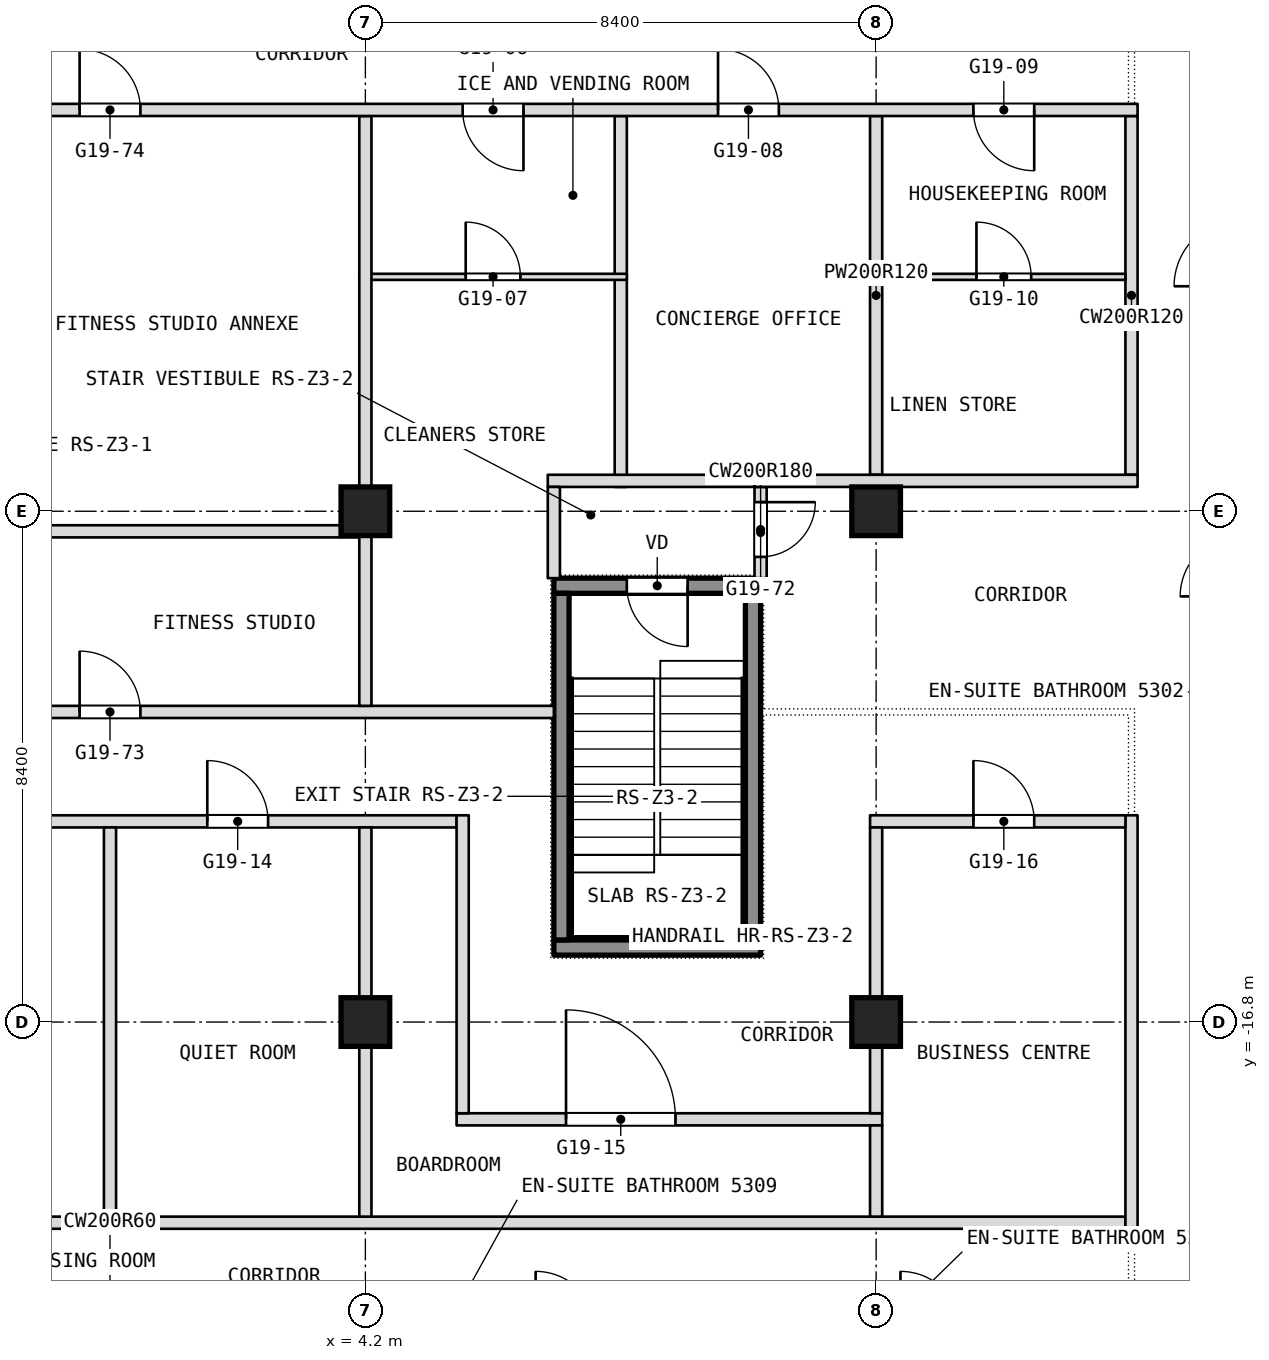
"""IFC4 building model, lengths in metres.
Left out: names, types, materials, properties, quantities, classifications, styles, units other than length and angle.
Written with IfcOpenShell. Run it as: python <this file> out.ifc"""

import sys

from ifc_helpers import new_model, si_unit, direction, frame, frame_2d, origin, origin_2d, place, context, subcontext, project, spatial, rectangle, extrude, element, fill, save


model = new_model("IFC4")
c1 = context("Model", 3, precision=1e-05, world=origin(), true_north=direction((0.0, 1.0)))
c2 = subcontext(c1, "Body", "Model", "MODEL_VIEW")
j1 = project(units=[si_unit("LENGTHUNIT", "METRE"), si_unit("PLANEANGLEUNIT", "RADIAN")], contexts=[c1])
p1 = place(None, origin())
s1 = spatial("IfcSite", under=j1, at=p1, CompositionType="ELEMENT")
p2 = place(p1, origin())
s2 = spatial("IfcBuilding", under=s1, at=p2, CompositionType="ELEMENT")
p3 = place(p2, frame((0.0, 0.0, 227.3)))
s3 = spatial("IfcBuildingStorey", under=s2, at=p3, CompositionType="ELEMENT", Elevation=227.3)
for number, where, z_axis, x_axis in (
    (1, (4.2, -16.8, 0.0), (0.0, 0.0, 1.0), (1.0, 0.0, 0.0)),
    (2, (4.2, -8.4, 0.0), (0.0, 0.0, 1.0), (1.0, 0.0, 0.0)),
    (3, (12.6, -16.8, 0.0), (0.0, 0.0, 1.0), (1.0, 0.0, 0.0)),
    (4, (12.6, -8.4, 0.0), (0.0, 0.0, 1.0), (1.0, 0.0, 0.0)),
):
    element("IfcColumn", number, at=place(p3, frame(where, z_axis=z_axis, x_axis=x_axis)), inside=s3, PredefinedType="COLUMN", context=c2, shape_type="SweptSolid", body=[
        extrude(rectangle(XDim=0.8, YDim=0.8, at=origin_2d()), origin(), (0.0, 0.0, 1.0), 3.6),
    ])
p4 = place(p3, frame((-16.7, -20.1, 0.0), z_axis=(0.0, 0.0, 1.0), x_axis=(1.0, 0.0, 0.0)))
e5 = element("IfcWall", 5, at=p4, inside=s3, PredefinedType="PARTITIONING", context=c2, shape_type="SweptSolid", body=[
    extrude(rectangle(XDim=33.4, YDim=0.2, at=frame_2d((16.7, 0.0))), origin(), (0.0, 0.0, 1.0), 3.34),
])
p5 = place(p3, frame((5.7, -18.4, 0.0), z_axis=(0.0, 0.0, 1.0), x_axis=(1.0, 0.0, 0.0)))
e6 = element("IfcWall", 6, at=p5, inside=s3, PredefinedType="PARTITIONING", context=c2, shape_type="SweptSolid", body=[
    extrude(rectangle(XDim=7.0, YDim=0.2, at=frame_2d((3.5, 0.0))), origin(), (0.0, 0.0, 1.0), 3.34),
])
p6 = place(p5, frame((1.8, 0.0, 0.0)))
e7 = element("IfcOpeningElement", 7, at=p6, cuts=e6, PredefinedType="OPENING", context=c2, shape_type="SweptSolid", body=[
    extrude(rectangle(XDim=1.8, YDim=2.1, at=frame_2d((0.9, 1.05))), frame((0.0, 0.1, 0.0), z_axis=(0.0, -1.0, 0.0), x_axis=(1.0, 0.0, 0.0)), (0.0, 0.0, 1.0), 0.2),
])
p7 = place(p3, frame((16.8, -20.2, 0.0), z_axis=(0.0, 0.0, 1.0), x_axis=(0.0, 1.0, 0.0)))
e8 = element("IfcWall", 8, at=p7, inside=s3, PredefinedType="PARTITIONING", context=c2, shape_type="SweptSolid", body=[
    extrude(rectangle(XDim=6.8, YDim=0.2, at=frame_2d((3.4, 0.0))), origin(), (0.0, 0.0, 1.0), 3.34),
])
p8 = place(p3, frame((16.8, -7.8, 0.0), z_axis=(0.0, 0.0, 1.0), x_axis=(0.0, 1.0, 0.0)))
e9 = element("IfcWall", 9, at=p8, inside=s3, PredefinedType="PARTITIONING", context=c2, shape_type="SweptSolid", body=[
    extrude(rectangle(XDim=5.9, YDim=0.2, at=frame_2d((2.95, 0.0))), origin(), (0.0, 0.0, 1.0), 3.34),
])
p9 = place(p3, frame((-5.9, -13.5, 0.0), z_axis=(0.0, 0.0, 1.0), x_axis=(1.0, 0.0, 0.0)))
e10 = element("IfcWall", 10, at=p9, inside=s3, PredefinedType="PARTITIONING", context=c2, shape_type="SweptSolid", body=[
    extrude(rectangle(XDim=11.6, YDim=0.2, at=frame_2d((5.8, 0.0))), origin(), (0.0, 0.0, 1.0), 3.34),
])
p10 = place(p9, frame((3.3, 0.0, 0.0)))
e11 = element("IfcOpeningElement", 11, at=p10, cuts=e10, PredefinedType="OPENING", context=c2, shape_type="SweptSolid", body=[
    extrude(rectangle(XDim=1.0, YDim=2.1, at=frame_2d((0.5, 1.05))), frame((0.0, 0.1, 0.0), z_axis=(0.0, -1.0, 0.0), x_axis=(1.0, 0.0, 0.0)), (0.0, 0.0, 1.0), 0.2),
])
p11 = place(p9, frame((7.5, 0.0, 0.0)))
e12 = element("IfcOpeningElement", 12, at=p11, cuts=e10, PredefinedType="OPENING", context=c2, shape_type="SweptSolid", body=[
    extrude(rectangle(XDim=1.0, YDim=2.1, at=frame_2d((0.5, 1.05))), frame((0.0, 0.1, 0.0), z_axis=(0.0, -1.0, 0.0), x_axis=(1.0, 0.0, 0.0)), (0.0, 0.0, 1.0), 0.2),
])
p12 = place(p3, frame((12.5, -13.5, 0.0), z_axis=(0.0, 0.0, 1.0), x_axis=(1.0, 0.0, 0.0)))
e13 = element("IfcWall", 13, at=p12, inside=s3, PredefinedType="PARTITIONING", context=c2, shape_type="SweptSolid", body=[
    extrude(rectangle(XDim=4.2, YDim=0.2, at=frame_2d((2.1, 0.0))), origin(), (0.0, 0.0, 1.0), 3.34),
])
p13 = place(p12, frame((1.7, 0.0, 0.0)))
e14 = element("IfcOpeningElement", 14, at=p13, cuts=e13, PredefinedType="OPENING", context=c2, shape_type="SweptSolid", body=[
    extrude(rectangle(XDim=1.0, YDim=2.1, at=frame_2d((0.5, 1.05))), frame((0.0, 0.1, 0.0), z_axis=(0.0, -1.0, 0.0), x_axis=(1.0, 0.0, 0.0)), (0.0, 0.0, 1.0), 0.2),
])
p14 = place(p3, frame((12.6, -20.0, 0.0), z_axis=(0.0, 0.0, 1.0), x_axis=(0.0, 1.0, 0.0)))
e15 = element("IfcWall", 15, at=p14, inside=s3, PredefinedType="PARTITIONING", context=c2, shape_type="SweptSolid", body=[
    extrude(rectangle(XDim=1.5, YDim=0.2, at=frame_2d((0.75, 0.0))), origin(), (0.0, 0.0, 1.0), 3.34),
])
p15 = place(p3, frame((12.6, -7.8, 0.0), z_axis=(0.0, 0.0, 1.0), x_axis=(0.0, 1.0, 0.0)))
e16 = element("IfcWall", 16, at=p15, inside=s3, PredefinedType="PARTITIONING", context=c2, shape_type="SweptSolid", body=[
    extrude(rectangle(XDim=5.9, YDim=0.2, at=frame_2d((2.95, 0.0))), origin(), (0.0, 0.0, 1.0), 3.34),
])
p16 = place(p3, frame((12.6, -18.3, 0.0), z_axis=(0.0, 0.0, 1.0), x_axis=(0.0, 1.0, 0.0)))
e17 = element("IfcWall", 17, at=p16, inside=s3, PredefinedType="PARTITIONING", context=c2, shape_type="SweptSolid", body=[
    extrude(rectangle(XDim=4.7, YDim=0.2, at=frame_2d((2.35, 0.0))), origin(), (0.0, 0.0, 1.0), 3.34),
])
p17 = place(p3, frame((-7.3, -11.7, 0.0), z_axis=(0.0, 0.0, 1.0), x_axis=(1.0, 0.0, 0.0)))
e18 = element("IfcWall", 18, at=p17, inside=s3, PredefinedType="PARTITIONING", context=c2, shape_type="SweptSolid", body=[
    extrude(rectangle(XDim=14.6, YDim=0.2, at=frame_2d((7.3, 0.0))), origin(), (0.0, 0.0, 1.0), 3.34),
])
p18 = place(p17, frame((6.8, 0.0, 0.0)))
e19 = element("IfcOpeningElement", 19, at=p18, cuts=e18, PredefinedType="OPENING", context=c2, shape_type="SweptSolid", body=[
    extrude(rectangle(XDim=1.0, YDim=2.1, at=frame_2d((0.5, 1.05))), frame((0.0, 0.1, 0.0), z_axis=(0.0, -1.0, 0.0), x_axis=(1.0, 0.0, 0.0)), (0.0, 0.0, 1.0), 0.2),
])
p19 = place(p3, frame((10.7, -9.5, 0.0), z_axis=(0.0, 0.0, 1.0), x_axis=(0.0, 1.0, 0.0)))
e20 = element("IfcWall", 20, at=p19, inside=s3, PredefinedType="PARTITIONING", context=c2, shape_type="SweptSolid", body=[
    extrude(rectangle(XDim=1.5, YDim=0.2, at=frame_2d((0.75, 0.0))), origin(), (0.0, 0.0, 1.0), 3.34),
])
p20 = place(p19, frame((0.35, 0.0, 0.0)))
e21 = element("IfcOpeningElement", 21, at=p20, cuts=e20, PredefinedType="OPENING", context=c2, shape_type="SweptSolid", body=[
    extrude(rectangle(XDim=0.9, YDim=2.1, at=frame_2d((0.45, 1.05))), frame((0.0, 0.1, 0.0), z_axis=(0.0, -1.0, 0.0), x_axis=(1.0, 0.0, 0.0)), (0.0, 0.0, 1.0), 0.2),
])
p21 = place(p3, frame((-4.1, -8.73, 0.0), z_axis=(0.0, 0.0, 1.0), x_axis=(1.0, 0.0, 0.0)))
e22 = element("IfcWall", 22, at=p21, inside=s3, PredefinedType="PARTITIONING", context=c2, shape_type="SweptSolid", body=[
    extrude(rectangle(XDim=8.2, YDim=0.2, at=frame_2d((4.1, 0.0))), origin(), (0.0, 0.0, 1.0), 3.34),
])
p22 = place(p3, frame((8.4, -8.0, 0.0), z_axis=(0.0, 0.0, 1.0), x_axis=(0.0, 1.0, 0.0)))
e23 = element("IfcWall", 23, at=p22, inside=s3, PredefinedType="PARTITIONING", context=c2, shape_type="SweptSolid", body=[
    extrude(rectangle(XDim=6.1, YDim=0.2, at=frame_2d((3.05, 0.0))), origin(), (0.0, 0.0, 1.0), 3.34),
])
p23 = place(p3, frame((10.6, -7.9, 0.0), z_axis=(0.0, 0.0, 1.0), x_axis=(1.0, 0.0, 0.0)))
e24 = element("IfcWall", 24, at=p23, inside=s3, PredefinedType="PARTITIONING", context=c2, shape_type="SweptSolid", body=[
    extrude(rectangle(XDim=6.3, YDim=0.2, at=frame_2d((3.15, 0.0))), origin(), (0.0, 0.0, 1.0), 3.34),
])
p24 = place(p3, frame((7.2, -7.9, 0.0), z_axis=(0.0, 0.0, 1.0), x_axis=(1.0, 0.0, 0.0)))
e25 = element("IfcWall", 25, at=p24, inside=s3, PredefinedType="PARTITIONING", context=c2, shape_type="SweptSolid", body=[
    extrude(rectangle(XDim=3.4, YDim=0.2, at=frame_2d((1.7, 0.0))), origin(), (0.0, 0.0, 1.0), 3.34),
])
p25 = place(p3, frame((7.3, -9.5, 0.0), z_axis=(0.0, 0.0, 1.0), x_axis=(0.0, 1.0, 0.0)))
e26 = element("IfcWall", 26, at=p25, inside=s3, PredefinedType="PARTITIONING", context=c2, shape_type="SweptSolid", body=[
    extrude(rectangle(XDim=1.5, YDim=0.2, at=frame_2d((0.75, 0.0))), origin(), (0.0, 0.0, 1.0), 3.34),
])
p26 = place(p3, frame((5.8, -18.3, 0.0), z_axis=(0.0, 0.0, 1.0), x_axis=(0.0, 1.0, 0.0)))
e27 = element("IfcWall", 27, at=p26, inside=s3, PredefinedType="PARTITIONING", context=c2, shape_type="SweptSolid", body=[
    extrude(rectangle(XDim=4.9, YDim=0.2, at=frame_2d((2.45, 0.0))), origin(), (0.0, 0.0, 1.0), 3.34),
])
p27 = place(p3, frame((4.1, -4.545, 0.0), z_axis=(0.0, 0.0, 1.0), x_axis=(1.0, 0.0, 0.0)))
e28 = element("IfcWall", 28, at=p27, inside=s3, PredefinedType="PARTITIONING", context=c2, shape_type="SweptSolid", body=[
    extrude(rectangle(XDim=4.4, YDim=0.1, at=frame_2d((2.2, 0.0))), origin(), (0.0, 0.0, 1.0), 3.34),
])
p28 = place(p27, frame((1.75, 0.0, 0.0)))
e29 = element("IfcOpeningElement", 29, at=p28, cuts=e28, PredefinedType="OPENING", context=c2, shape_type="SweptSolid", body=[
    extrude(rectangle(XDim=0.9, YDim=2.1, at=frame_2d((0.45, 1.05))), frame((0.0, 0.05, 0.0), z_axis=(0.0, -1.0, 0.0), x_axis=(1.0, 0.0, 0.0)), (0.0, 0.0, 1.0), 0.1),
])
p29 = place(p3, frame((12.7, -4.545, 0.0), z_axis=(0.0, 0.0, 1.0), x_axis=(1.0, 0.0, 0.0)))
e30 = element("IfcWall", 30, at=p29, inside=s3, PredefinedType="PARTITIONING", context=c2, shape_type="SweptSolid", body=[
    extrude(rectangle(XDim=4.0, YDim=0.1, at=frame_2d((2.0, 0.0))), origin(), (0.0, 0.0, 1.0), 3.34),
])
p30 = place(p29, frame((1.55, 0.0, 0.0)))
e31 = element("IfcOpeningElement", 31, at=p30, cuts=e30, PredefinedType="OPENING", context=c2, shape_type="SweptSolid", body=[
    extrude(rectangle(XDim=0.9, YDim=2.1, at=frame_2d((0.45, 1.05))), frame((0.0, 0.05, 0.0), z_axis=(0.0, -1.0, 0.0), x_axis=(1.0, 0.0, 0.0)), (0.0, 0.0, 1.0), 0.1),
])
p31 = place(p3, frame((4.2, -20.0, 0.0), z_axis=(0.0, 0.0, 1.0), x_axis=(0.0, 1.0, 0.0)))
e32 = element("IfcWall", 32, at=p31, inside=s3, PredefinedType="PARTITIONING", context=c2, shape_type="SweptSolid", body=[
    extrude(rectangle(XDim=6.4, YDim=0.2, at=frame_2d((3.2, 0.0))), origin(), (0.0, 0.0, 1.0), 3.34),
])
p32 = place(p3, frame((4.2, -11.6, 0.0), z_axis=(0.0, 0.0, 1.0), x_axis=(0.0, 1.0, 0.0)))
e33 = element("IfcWall", 33, at=p32, inside=s3, PredefinedType="PARTITIONING", context=c2, shape_type="SweptSolid", body=[
    extrude(rectangle(XDim=9.7, YDim=0.2, at=frame_2d((4.85, 0.0))), origin(), (0.0, 0.0, 1.0), 3.34),
])
p33 = place(p3, frame((-16.9, -1.8, 0.0), z_axis=(0.0, 0.0, 1.0), x_axis=(1.0, 0.0, 0.0)))
e34 = element("IfcWall", 34, at=p33, inside=s3, PredefinedType="PARTITIONING", context=c2, shape_type="SweptSolid", body=[
    extrude(rectangle(XDim=33.8, YDim=0.2, at=frame_2d((16.9, 0.0))), origin(), (0.0, 0.0, 1.0), 3.34),
])
p34 = place(p33, frame((1.7, 0.0, 0.0)))
e35 = element("IfcOpeningElement", 35, at=p34, cuts=e34, PredefinedType="OPENING", context=c2, shape_type="SweptSolid", body=[
    extrude(rectangle(XDim=1.0, YDim=2.1, at=frame_2d((0.5, 1.05))), frame((0.0, 0.1, 0.0), z_axis=(0.0, -1.0, 0.0), x_axis=(1.0, 0.0, 0.0)), (0.0, 0.0, 1.0), 0.2),
])
p35 = place(p33, frame((5.9, 0.0, 0.0)))
e36 = element("IfcOpeningElement", 36, at=p35, cuts=e34, PredefinedType="OPENING", context=c2, shape_type="SweptSolid", body=[
    extrude(rectangle(XDim=1.0, YDim=2.1, at=frame_2d((0.5, 1.05))), frame((0.0, 0.1, 0.0), z_axis=(0.0, -1.0, 0.0), x_axis=(1.0, 0.0, 0.0)), (0.0, 0.0, 1.0), 0.2),
])
p36 = place(p33, frame((10.1, 0.0, 0.0)))
e37 = element("IfcOpeningElement", 37, at=p36, cuts=e34, PredefinedType="OPENING", context=c2, shape_type="SweptSolid", body=[
    extrude(rectangle(XDim=1.0, YDim=2.1, at=frame_2d((0.5, 1.05))), frame((0.0, 0.1, 0.0), z_axis=(0.0, -1.0, 0.0), x_axis=(1.0, 0.0, 0.0)), (0.0, 0.0, 1.0), 0.2),
])
p37 = place(p33, frame((22.7, 0.0, 0.0)))
e38 = element("IfcOpeningElement", 38, at=p37, cuts=e34, PredefinedType="OPENING", context=c2, shape_type="SweptSolid", body=[
    extrude(rectangle(XDim=1.0, YDim=2.1, at=frame_2d((0.5, 1.05))), frame((0.0, 0.1, 0.0), z_axis=(0.0, -1.0, 0.0), x_axis=(1.0, 0.0, 0.0)), (0.0, 0.0, 1.0), 0.2),
])
p38 = place(p33, frame((26.9, 0.0, 0.0)))
e39 = element("IfcOpeningElement", 39, at=p38, cuts=e34, PredefinedType="OPENING", context=c2, shape_type="SweptSolid", body=[
    extrude(rectangle(XDim=1.0, YDim=2.1, at=frame_2d((0.5, 1.05))), frame((0.0, 0.1, 0.0), z_axis=(0.0, -1.0, 0.0), x_axis=(1.0, 0.0, 0.0)), (0.0, 0.0, 1.0), 0.2),
])
p39 = place(p33, frame((31.1, 0.0, 0.0)))
e40 = element("IfcOpeningElement", 40, at=p39, cuts=e34, PredefinedType="OPENING", context=c2, shape_type="SweptSolid", body=[
    extrude(rectangle(XDim=1.0, YDim=2.1, at=frame_2d((0.5, 1.05))), frame((0.0, 0.1, 0.0), z_axis=(0.0, -1.0, 0.0), x_axis=(1.0, 0.0, 0.0)), (0.0, 0.0, 1.0), 0.2),
])
p40 = place(p33, frame((16.4, 0.0, 0.0)))
e41 = element("IfcOpeningElement", 41, at=p40, cuts=e34, PredefinedType="OPENING", context=c2, shape_type="SweptSolid", body=[
    extrude(rectangle(XDim=1.0, YDim=2.1, at=frame_2d((0.5, 1.05))), frame((0.0, 0.1, 0.0), z_axis=(0.0, -1.0, 0.0), x_axis=(1.0, 0.0, 0.0)), (0.0, 0.0, 1.0), 0.2),
])
p41 = place(p3, frame((0.0, -20.0, 0.0), z_axis=(0.0, 0.0, 1.0), x_axis=(0.0, 1.0, 0.0)))
e42 = element("IfcWall", 42, at=p41, inside=s3, PredefinedType="PARTITIONING", context=c2, shape_type="SweptSolid", body=[
    extrude(rectangle(XDim=6.4, YDim=0.2, at=frame_2d((3.2, 0.0))), origin(), (0.0, 0.0, 1.0), 3.34),
])
p42 = place(p3, frame((7.3, -15.575, 0.1), z_axis=(0.0, 0.0, 1.0), x_axis=(1.0, 0.0, 0.0)))
e43 = element("IfcWall", 43, at=p42, inside=s3, PredefinedType="SHEAR", context=c2, shape_type="SweptSolid", body=[
    extrude(rectangle(XDim=3.4, YDim=0.25, at=frame_2d((1.7, 0.0))), origin(), (0.0, 0.0, 1.0), 3.6),
])
p43 = place(p3, frame((7.3, -9.625, 0.1), z_axis=(0.0, 0.0, 1.0), x_axis=(1.0, 0.0, 0.0)))
e44 = element("IfcWall", 44, at=p43, inside=s3, PredefinedType="SHEAR", context=c2, shape_type="SweptSolid", body=[
    extrude(rectangle(XDim=3.4, YDim=0.25, at=frame_2d((1.7, 0.0))), origin(), (0.0, 0.0, 1.0), 3.6),
])
p44 = place(p43, frame((1.2, 0.0, 0.0)))
e45 = element("IfcOpeningElement", 45, at=p44, cuts=e44, PredefinedType="OPENING", context=c2, shape_type="SweptSolid", body=[
    extrude(rectangle(XDim=1.0, YDim=2.1, at=frame_2d((0.5, 1.05))), frame((0.0, 0.125, 0.0), z_axis=(0.0, -1.0, 0.0), x_axis=(1.0, 0.0, 0.0)), (0.0, 0.0, 1.0), 0.25),
])
for number, where, z_axis, x_axis in (
    (46, (7.425, -15.45, 0.1), (0.0, 0.0, 1.0), (0.0, 1.0, 0.0)),
    (47, (10.575, -15.45, 0.1), (0.0, 0.0, 1.0), (0.0, 1.0, 0.0)),
):
    element("IfcWall", number, at=place(p3, frame(where, z_axis=z_axis, x_axis=x_axis)), inside=s3, PredefinedType="SHEAR", context=c2, shape_type="SweptSolid", body=[
        extrude(rectangle(XDim=5.7, YDim=0.25, at=frame_2d((2.85, 0.0))), origin(), (0.0, 0.0, 1.0), 3.6),
    ])
p45 = place(p6, origin())
e48 = element("IfcDoor", 48, at=p45, inside=s3, OperationType="DOUBLE_DOOR_SINGLE_SWING", PredefinedType="DOOR", context=c2, shape_type="SweptSolid", body=[
    extrude(rectangle(XDim=1.8, YDim=2.1, at=frame_2d((0.9, 1.05))), frame((0.0, 0.025, 0.0), z_axis=(0.0, -1.0, 0.0), x_axis=(1.0, 0.0, 0.0)), (0.0, 0.0, 1.0), 0.05),
])
fill(e7, e48)
p46 = place(p11, origin())
e49 = element("IfcDoor", 49, at=p46, inside=s3, OperationType="SINGLE_SWING_RIGHT", PredefinedType="DOOR", context=c2, shape_type="SweptSolid", body=[
    extrude(rectangle(XDim=1.0, YDim=2.1, at=frame_2d((0.5, 1.05))), frame((0.0, 0.025, 0.0), z_axis=(0.0, -1.0, 0.0), x_axis=(1.0, 0.0, 0.0)), (0.0, 0.0, 1.0), 0.05),
])
fill(e12, e49)
p47 = place(p13, origin())
e50 = element("IfcDoor", 50, at=p47, inside=s3, OperationType="SINGLE_SWING_RIGHT", PredefinedType="DOOR", context=c2, shape_type="SweptSolid", body=[
    extrude(rectangle(XDim=1.0, YDim=2.1, at=frame_2d((0.5, 1.05))), frame((0.0, 0.025, 0.0), z_axis=(0.0, -1.0, 0.0), x_axis=(1.0, 0.0, 0.0)), (0.0, 0.0, 1.0), 0.05),
])
fill(e14, e50)
p48 = place(p18, origin())
e51 = element("IfcDoor", 51, at=p48, inside=s3, OperationType="SINGLE_SWING_LEFT", PredefinedType="DOOR", context=c2, shape_type="SweptSolid", body=[
    extrude(rectangle(XDim=1.0, YDim=2.1, at=frame_2d((0.5, 1.05))), frame((0.0, 0.025, 0.0), z_axis=(0.0, -1.0, 0.0), x_axis=(1.0, 0.0, 0.0)), (0.0, 0.0, 1.0), 0.05),
])
fill(e19, e51)
p49 = place(p20, origin())
e52 = element("IfcDoor", 52, at=p49, inside=s3, OperationType="SINGLE_SWING_RIGHT", PredefinedType="DOOR", context=c2, shape_type="SweptSolid", body=[
    extrude(rectangle(XDim=0.9, YDim=2.1, at=frame_2d((0.45, 1.05))), frame((0.0, 0.025, 0.0), z_axis=(0.0, -1.0, 0.0), x_axis=(1.0, 0.0, 0.0)), (0.0, 0.0, 1.0), 0.05),
])
fill(e21, e52)
p50 = place(p28, origin())
e53 = element("IfcDoor", 53, at=p50, inside=s3, OperationType="SINGLE_SWING_LEFT", PredefinedType="DOOR", context=c2, shape_type="SweptSolid", body=[
    extrude(rectangle(XDim=0.9, YDim=2.1, at=frame_2d((0.45, 1.05))), frame((0.0, 0.025, 0.0), z_axis=(0.0, -1.0, 0.0), x_axis=(1.0, 0.0, 0.0)), (0.0, 0.0, 1.0), 0.05),
])
fill(e29, e53)
p51 = place(p30, origin())
e54 = element("IfcDoor", 54, at=p51, inside=s3, OperationType="SINGLE_SWING_RIGHT", PredefinedType="DOOR", context=c2, shape_type="SweptSolid", body=[
    extrude(rectangle(XDim=0.9, YDim=2.1, at=frame_2d((0.45, 1.05))), frame((0.0, 0.025, 0.0), z_axis=(0.0, -1.0, 0.0), x_axis=(1.0, 0.0, 0.0)), (0.0, 0.0, 1.0), 0.05),
])
fill(e31, e54)
p52 = place(p37, origin())
e55 = element("IfcDoor", 55, at=p52, inside=s3, OperationType="SINGLE_SWING_RIGHT", PredefinedType="DOOR", context=c2, shape_type="SweptSolid", body=[
    extrude(rectangle(XDim=1.0, YDim=2.1, at=frame_2d((0.5, 1.05))), frame((0.0, 0.025, 0.0), z_axis=(0.0, -1.0, 0.0), x_axis=(1.0, 0.0, 0.0)), (0.0, 0.0, 1.0), 0.05),
])
fill(e38, e55)
p53 = place(p38, origin())
e56 = element("IfcDoor", 56, at=p53, inside=s3, OperationType="SINGLE_SWING_LEFT", PredefinedType="DOOR", context=c2, shape_type="SweptSolid", body=[
    extrude(rectangle(XDim=1.0, YDim=2.1, at=frame_2d((0.5, 1.05))), frame((0.0, 0.025, 0.0), z_axis=(0.0, -1.0, 0.0), x_axis=(1.0, 0.0, 0.0)), (0.0, 0.0, 1.0), 0.05),
])
fill(e39, e56)
p54 = place(p39, origin())
e57 = element("IfcDoor", 57, at=p54, inside=s3, OperationType="SINGLE_SWING_LEFT", PredefinedType="DOOR", context=c2, shape_type="SweptSolid", body=[
    extrude(rectangle(XDim=1.0, YDim=2.1, at=frame_2d((0.5, 1.05))), frame((0.0, 0.025, 0.0), z_axis=(0.0, -1.0, 0.0), x_axis=(1.0, 0.0, 0.0)), (0.0, 0.0, 1.0), 0.05),
])
fill(e40, e57)
p55 = place(p40, origin())
e58 = element("IfcDoor", 58, at=p55, inside=s3, OperationType="SINGLE_SWING_LEFT", PredefinedType="DOOR", context=c2, shape_type="SweptSolid", body=[
    extrude(rectangle(XDim=1.0, YDim=2.1, at=frame_2d((0.5, 1.05))), frame((0.0, 0.025, 0.0), z_axis=(0.0, -1.0, 0.0), x_axis=(1.0, 0.0, 0.0)), (0.0, 0.0, 1.0), 0.05),
])
fill(e41, e58)
p56 = place(p44, origin())
e59 = element("IfcDoor", 59, at=p56, inside=s3, OperationType="SINGLE_SWING_LEFT", PredefinedType="DOOR", context=c2, shape_type="SweptSolid", body=[
    extrude(rectangle(XDim=1.0, YDim=2.1, at=frame_2d((0.5, 1.05))), frame((0.0, 0.025, 0.0), z_axis=(0.0, -1.0, 0.0), x_axis=(1.0, 0.0, 0.0)), (0.0, 0.0, 1.0), 0.05),
])
fill(e45, e59)
save(model, sys.argv[1])
